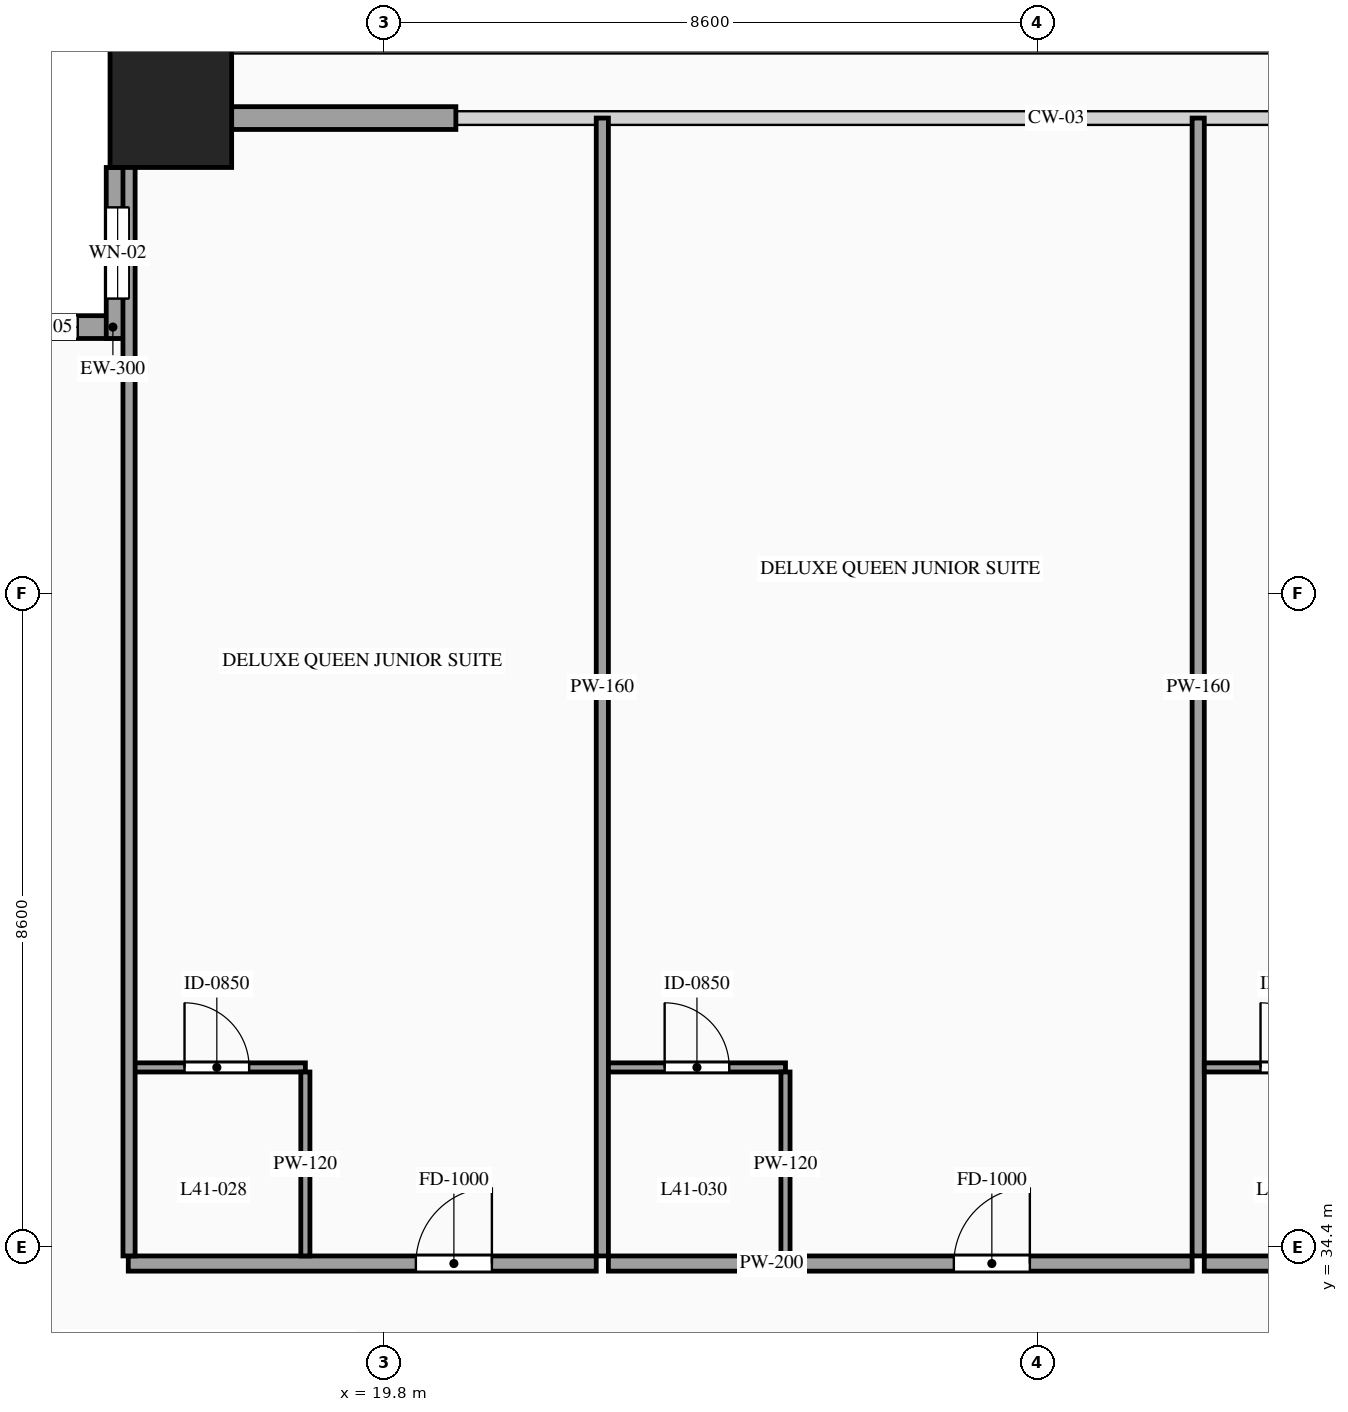
"""IFC4 building model, lengths in metres.
Left out: names, types, materials, properties, quantities, classifications, styles, units other than length and angle.
Written with IfcOpenShell. Run it as: python <this file> out.ifc"""

import sys

from ifc_helpers import new_model, si_unit, direction, frame, frame_2d, origin, origin_2d, place, context, subcontext, project, spatial, rectangle, hollow_rectangle, extrude, source, transform, mapped, element, fill, save


model = new_model("IFC4")
c1 = context("Model", 3, precision=1e-05, world=origin(), true_north=direction((0.0, 1.0)))
c2 = subcontext(c1, "Body", "Model", "MODEL_VIEW")
j1 = project(units=[si_unit("LENGTHUNIT", "METRE"), si_unit("PLANEANGLEUNIT", "RADIAN")], contexts=[c1])
p1 = place(None, origin())
s1 = spatial("IfcSite", under=j1, at=p1, CompositionType="ELEMENT")
p2 = place(p1, origin())
s2 = spatial("IfcBuilding", under=s1, at=p2, CompositionType="ELEMENT")
p3 = place(p2, frame((0.0, 0.0, 156.0)))
s3 = spatial("IfcBuildingStorey", under=s2, at=p3, CompositionType="ELEMENT", Elevation=156.0)
m1 = source(origin(), c2, "Body", "SweptSolid", [
    extrude(hollow_rectangle(XDim=1.6, YDim=1.6, WallThickness=0.07, at=origin_2d()), origin(), (0.0, 0.0, 1.0), 3.6),
])
p4 = place(p3, frame((17.0, 49.4, 0.0), z_axis=(0.0, 0.0, 1.0), x_axis=(1.0, 0.0, 0.0)))
e1 = element("IfcColumn", 1, at=p4, inside=s3, PredefinedType="COLUMN", context=c2, shape_type="MappedRepresentation", body=[
    mapped(m1, transform((0.0, 0.0, 0.0), scale=1.0)),
])
p5 = place(p3, frame((16.45, 46.5, 0.0), z_axis=(0.0, 0.0, 1.0), x_axis=(-1.0, 0.0, 0.0)))
e2 = element("IfcWall", 2, at=p5, inside=s3, PredefinedType="SOLIDWALL", context=c2, shape_type="SweptSolid", body=[
    extrude(rectangle(XDim=2.25, YDim=0.3, at=frame_2d((1.125, 0.0))), origin(), (0.0, 0.0, 1.0), 3.38),
])
p6 = place(p5, frame((0.675, 0.0, 0.85)))
e3 = element("IfcOpeningElement", 3, at=p6, cuts=e2, PredefinedType="OPENING", context=c2, shape_type="SweptSolid", body=[
    extrude(rectangle(XDim=0.9, YDim=1.5, at=frame_2d((0.45, 0.75))), frame((0.0, 0.165, 0.0), z_axis=(0.0, -1.0, 0.0), x_axis=(1.0, 0.0, 0.0)), (0.0, 0.0, 1.0), 0.33),
])
p7 = place(p3, frame((16.3, 48.6, 0.0), z_axis=(0.0, 0.0, 1.0), x_axis=(0.0, -1.0, 0.0)))
e4 = element("IfcWall", 4, at=p7, inside=s3, PredefinedType="SOLIDWALL", context=c2, shape_type="SweptSolid", body=[
    extrude(rectangle(XDim=2.25, YDim=0.3, at=frame_2d((1.125, 0.0))), origin(), (0.0, 0.0, 1.0), 3.38),
])
p8 = place(p7, frame((0.525, 0.0, 0.85)))
e5 = element("IfcOpeningElement", 5, at=p8, cuts=e4, PredefinedType="OPENING", context=c2, shape_type="SweptSolid", body=[
    extrude(rectangle(XDim=1.2, YDim=2.1, at=frame_2d((0.6, 1.05))), frame((0.0, 0.165, 0.0), z_axis=(0.0, -1.0, 0.0), x_axis=(1.0, 0.0, 0.0)), (0.0, 0.0, 1.0), 0.33),
])
m2 = source(origin(), c2, "Body", "SweptSolid", [
    extrude(rectangle(XDim=2.95, YDim=0.3, at=frame_2d((1.475, 0.0))), origin(), (0.0, 0.0, 1.0), 2.775),
])
p9 = place(p3, frame((17.8, 49.25, 0.0), z_axis=(0.0, 0.0, 1.0), x_axis=(1.0, 0.0, 0.0)))
e6 = element("IfcWall", 6, at=p9, inside=s3, PredefinedType="SOLIDWALL", context=c2, shape_type="MappedRepresentation", body=[
    mapped(m2, transform((0.0, 0.0, 0.0), scale=1.0)),
])
p10 = place(p3, frame((16.44, 34.18, 0.0), z_axis=(0.0, 0.0, 1.0), x_axis=(1.0, 0.0, 0.0)))
e7 = element("IfcWall", 7, at=p10, inside=s3, PredefinedType="PARTITIONING", context=c2, shape_type="SweptSolid", body=[
    extrude(rectangle(XDim=6.157, YDim=0.2, at=frame_2d((3.079, 0.0))), origin(), (0.0, 0.0, 1.0), 3.38),
])
p11 = place(p10, frame((3.784, 0.0, 0.0)))
e8 = element("IfcOpeningElement", 8, at=p11, cuts=e7, PredefinedType="OPENING", context=c2, shape_type="SweptSolid", body=[
    extrude(rectangle(XDim=1.0, YDim=2.2, at=frame_2d((0.5, 1.1))), frame((0.0, 0.115, 0.0), z_axis=(0.0, -1.0, 0.0), x_axis=(1.0, 0.0, 0.0)), (0.0, 0.0, 1.0), 0.23),
])
m3 = source(origin(), c2, "Body", "SweptSolid", [
    extrude(rectangle(XDim=14.97, YDim=0.16, at=frame_2d((7.485, 0.0))), origin(), (0.0, 0.0, 1.0), 3.38),
])
p12 = place(p3, frame((22.677, 34.28, 0.0), z_axis=(0.0, 0.0, 1.0), x_axis=(0.0, 1.0, 0.0)))
e9 = element("IfcWall", 9, at=p12, inside=s3, PredefinedType="PARTITIONING", context=c2, shape_type="MappedRepresentation", body=[
    mapped(m3, transform((0.0, 0.0, 0.0), scale=1.0)),
])
p13 = place(p3, frame((16.44, 36.76, 0.0), z_axis=(0.0, 0.0, 1.0), x_axis=(1.0, 0.0, 0.0)))
e10 = element("IfcWall", 10, at=p13, inside=s3, PredefinedType="PARTITIONING", context=c2, shape_type="SweptSolid", body=[
    extrude(rectangle(XDim=2.33, YDim=0.12, at=frame_2d((1.165, 0.0))), origin(), (0.0, 0.0, 1.0), 3.38),
])
p14 = place(p13, frame((0.74, 0.0, 0.0)))
e11 = element("IfcOpeningElement", 11, at=p14, cuts=e10, PredefinedType="OPENING", context=c2, shape_type="SweptSolid", body=[
    extrude(rectangle(XDim=0.85, YDim=2.1, at=frame_2d((0.425, 1.05))), frame((0.0, 0.075, 0.0), z_axis=(0.0, -1.0, 0.0), x_axis=(1.0, 0.0, 0.0)), (0.0, 0.0, 1.0), 0.15),
])
m4 = source(origin(), c2, "Body", "SweptSolid", [
    extrude(rectangle(XDim=2.42, YDim=0.12, at=frame_2d((1.21, 0.0))), origin(), (0.0, 0.0, 1.0), 3.38),
])
p15 = place(p3, frame((18.77, 34.28, 0.0), z_axis=(0.0, 0.0, 1.0), x_axis=(0.0, 1.0, 0.0)))
e12 = element("IfcWall", 12, at=p15, inside=s3, PredefinedType="PARTITIONING", context=c2, shape_type="MappedRepresentation", body=[
    mapped(m4, transform((0.0, 0.0, 0.0), scale=1.0)),
])
p16 = place(p3, frame((22.757, 34.18, 0.0), z_axis=(0.0, 0.0, 1.0), x_axis=(1.0, 0.0, 0.0)))
e13 = element("IfcWall", 13, at=p16, inside=s3, PredefinedType="PARTITIONING", context=c2, shape_type="SweptSolid", body=[
    extrude(rectangle(XDim=7.68, YDim=0.2, at=frame_2d((3.84, 0.0))), origin(), (0.0, 0.0, 1.0), 3.38),
])
p17 = place(p16, frame((4.545, 0.0, 0.0)))
e14 = element("IfcOpeningElement", 14, at=p17, cuts=e13, PredefinedType="OPENING", context=c2, shape_type="SweptSolid", body=[
    extrude(rectangle(XDim=1.0, YDim=2.2, at=frame_2d((0.5, 1.1))), frame((0.0, 0.115, 0.0), z_axis=(0.0, -1.0, 0.0), x_axis=(1.0, 0.0, 0.0)), (0.0, 0.0, 1.0), 0.23),
])
p18 = place(p3, frame((30.517, 34.28, 0.0), z_axis=(0.0, 0.0, 1.0), x_axis=(0.0, 1.0, 0.0)))
e15 = element("IfcWall", 15, at=p18, inside=s3, PredefinedType="PARTITIONING", context=c2, shape_type="MappedRepresentation", body=[
    mapped(m3, transform((0.0, 0.0, 0.0), scale=1.0)),
])
p19 = place(p3, frame((22.757, 36.76, 0.0), z_axis=(0.0, 0.0, 1.0), x_axis=(1.0, 0.0, 0.0)))
e16 = element("IfcWall", 16, at=p19, inside=s3, PredefinedType="PARTITIONING", context=c2, shape_type="SweptSolid", body=[
    extrude(rectangle(XDim=2.33, YDim=0.12, at=frame_2d((1.165, 0.0))), origin(), (0.0, 0.0, 1.0), 3.38),
])
p20 = place(p19, frame((0.74, 0.0, 0.0)))
e17 = element("IfcOpeningElement", 17, at=p20, cuts=e16, PredefinedType="OPENING", context=c2, shape_type="SweptSolid", body=[
    extrude(rectangle(XDim=0.85, YDim=2.1, at=frame_2d((0.425, 1.05))), frame((0.0, 0.075, 0.0), z_axis=(0.0, -1.0, 0.0), x_axis=(1.0, 0.0, 0.0)), (0.0, 0.0, 1.0), 0.15),
])
p21 = place(p3, frame((25.087, 34.28, 0.0), z_axis=(0.0, 0.0, 1.0), x_axis=(0.0, 1.0, 0.0)))
e18 = element("IfcWall", 18, at=p21, inside=s3, PredefinedType="PARTITIONING", context=c2, shape_type="MappedRepresentation", body=[
    mapped(m4, transform((0.0, 0.0, 0.0), scale=1.0)),
])
p22 = place(p3, frame((30.597, 34.18, 0.0), z_axis=(0.0, 0.0, 1.0), x_axis=(1.0, 0.0, 0.0)))
e19 = element("IfcWall", 19, at=p22, inside=s3, PredefinedType="PARTITIONING", context=c2, shape_type="SweptSolid", body=[
    extrude(rectangle(XDim=6.323, YDim=0.2, at=frame_2d((3.162, 0.0))), origin(), (0.0, 0.0, 1.0), 3.38),
])
p23 = place(p22, frame((3.866, 0.0, 0.0)))
e20 = element("IfcOpeningElement", 20, at=p23, cuts=e19, PredefinedType="OPENING", context=c2, shape_type="SweptSolid", body=[
    extrude(rectangle(XDim=1.0, YDim=2.2, at=frame_2d((0.5, 1.1))), frame((0.0, 0.115, 0.0), z_axis=(0.0, -1.0, 0.0), x_axis=(1.0, 0.0, 0.0)), (0.0, 0.0, 1.0), 0.23),
])
p24 = place(p3, frame((30.597, 36.76, 0.0), z_axis=(0.0, 0.0, 1.0), x_axis=(1.0, 0.0, 0.0)))
e21 = element("IfcWall", 21, at=p24, inside=s3, PredefinedType="PARTITIONING", context=c2, shape_type="SweptSolid", body=[
    extrude(rectangle(XDim=2.33, YDim=0.12, at=frame_2d((1.165, 0.0))), origin(), (0.0, 0.0, 1.0), 3.38),
])
p25 = place(p24, frame((0.74, 0.0, 0.0)))
e22 = element("IfcOpeningElement", 22, at=p25, cuts=e21, PredefinedType="OPENING", context=c2, shape_type="SweptSolid", body=[
    extrude(rectangle(XDim=0.85, YDim=2.1, at=frame_2d((0.425, 1.05))), frame((0.0, 0.075, 0.0), z_axis=(0.0, -1.0, 0.0), x_axis=(1.0, 0.0, 0.0)), (0.0, 0.0, 1.0), 0.15),
])
m5 = source(origin(), c2, "Body", "SweptSolid", [
    extrude(rectangle(XDim=14.82, YDim=0.16, at=frame_2d((7.41, 0.0))), origin(), (0.0, 0.0, 1.0), 3.38),
])
p26 = place(p3, frame((16.45, 34.28, 0.0), z_axis=(0.0, 0.0, 1.0), x_axis=(0.0, 1.0, 0.0)))
e23 = element("IfcWall", 23, at=p26, inside=s3, PredefinedType="PARTITIONING", context=c2, shape_type="MappedRepresentation", body=[
    mapped(m5, transform((0.0, 0.0, 0.0), scale=1.0)),
])
m6 = source(origin(), c2, "Body", "SweptSolid", [
    extrude(rectangle(XDim=0.9, YDim=1.5, at=frame_2d((0.45, 0.75))), frame((0.0, 0.03, 0.0), z_axis=(0.0, -1.0, 0.0), x_axis=(1.0, 0.0, 0.0)), (0.0, 0.0, 1.0), 0.06),
])
p27 = place(p6, origin())
e24 = element("IfcWindow", 24, at=p27, inside=s3, PartitioningType="SINGLE_PANEL", PredefinedType="WINDOW", context=c2, shape_type="MappedRepresentation", body=[
    mapped(m6, transform((0.0, 0.0, 0.0), scale=1.0)),
])
fill(e3, e24)
m7 = source(origin(), c2, "Body", "SweptSolid", [
    extrude(rectangle(XDim=1.2, YDim=2.1, at=frame_2d((0.6, 1.05))), frame((0.0, 0.03, 0.0), z_axis=(0.0, -1.0, 0.0), x_axis=(1.0, 0.0, 0.0)), (0.0, 0.0, 1.0), 0.06),
])
p28 = place(p8, origin())
e25 = element("IfcWindow", 25, at=p28, inside=s3, PartitioningType="SINGLE_PANEL", PredefinedType="WINDOW", context=c2, shape_type="MappedRepresentation", body=[
    mapped(m7, transform((0.0, 0.0, 0.0), scale=1.0)),
])
fill(e5, e25)
m8 = source(origin(), c2, "Body", "SweptSolid", [
    extrude(rectangle(XDim=1.0, YDim=2.2, at=frame_2d((0.5, 1.1))), frame((0.0, 0.025, 0.0), z_axis=(0.0, -1.0, 0.0), x_axis=(1.0, 0.0, 0.0)), (0.0, 0.0, 1.0), 0.05),
])
p29 = place(p11, origin())
e26 = element("IfcDoor", 26, at=p29, inside=s3, OperationType="SINGLE_SWING_RIGHT", PredefinedType="DOOR", context=c2, shape_type="MappedRepresentation", body=[
    mapped(m8, transform((0.0, 0.0, 0.0), scale=1.0)),
])
fill(e8, e26)
m9 = source(origin(), c2, "Body", "SweptSolid", [
    extrude(rectangle(XDim=0.85, YDim=2.1, at=frame_2d((0.425, 1.05))), frame((0.0, 0.025, 0.0), z_axis=(0.0, -1.0, 0.0), x_axis=(1.0, 0.0, 0.0)), (0.0, 0.0, 1.0), 0.05),
])
p30 = place(p14, origin())
e27 = element("IfcDoor", 27, at=p30, inside=s3, OperationType="SINGLE_SWING_LEFT", PredefinedType="DOOR", context=c2, shape_type="MappedRepresentation", body=[
    mapped(m9, transform((0.0, 0.0, 0.0), scale=1.0)),
])
fill(e11, e27)
p31 = place(p17, origin())
e28 = element("IfcDoor", 28, at=p31, inside=s3, OperationType="SINGLE_SWING_RIGHT", PredefinedType="DOOR", context=c2, shape_type="MappedRepresentation", body=[
    mapped(m8, transform((0.0, 0.0, 0.0), scale=1.0)),
])
fill(e14, e28)
p32 = place(p20, origin())
e29 = element("IfcDoor", 29, at=p32, inside=s3, OperationType="SINGLE_SWING_LEFT", PredefinedType="DOOR", context=c2, shape_type="MappedRepresentation", body=[
    mapped(m9, transform((0.0, 0.0, 0.0), scale=1.0)),
])
fill(e17, e29)
p33 = place(p25, origin())
e30 = element("IfcDoor", 30, at=p33, inside=s3, OperationType="SINGLE_SWING_LEFT", PredefinedType="DOOR", context=c2, shape_type="MappedRepresentation", body=[
    mapped(m9, transform((0.0, 0.0, 0.0), scale=1.0)),
])
fill(e22, e30)
save(model, sys.argv[1])
